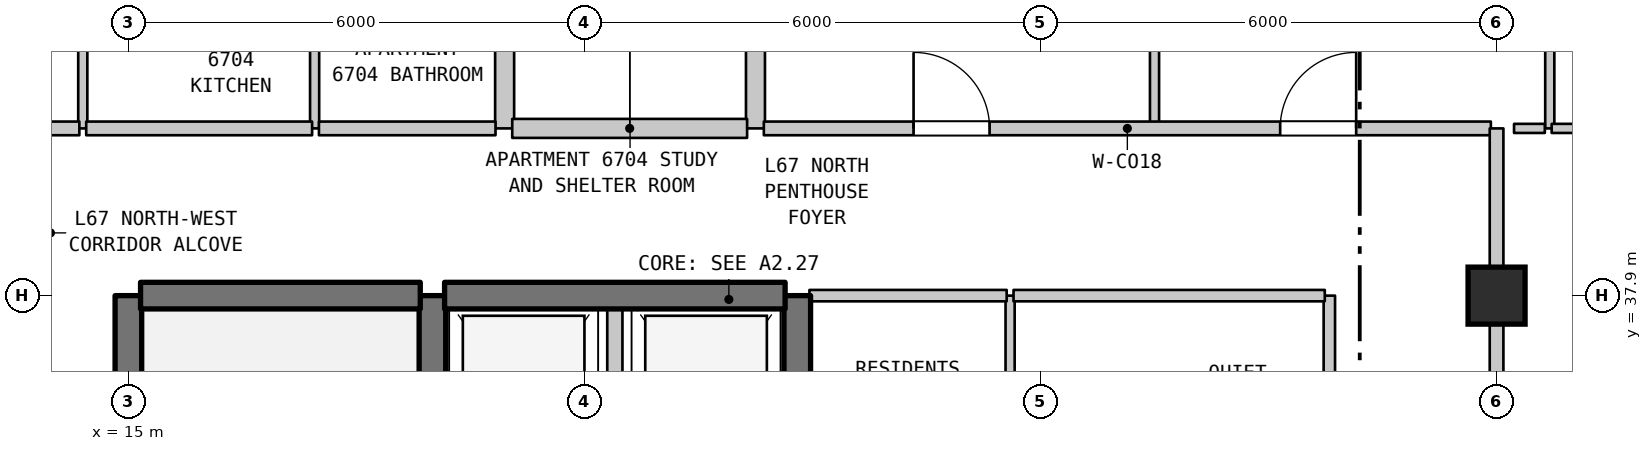
"""IFC4 building model, lengths in metres.
Left out: names, types, materials, properties, quantities, classifications, styles, units other than length and angle.
Written with IfcOpenShell. Run it as: python <this file> out.ifc"""

import sys

from ifc_helpers import new_model, si_unit, direction, frame, frame_2d, origin, origin_2d, place, context, subcontext, project, spatial, rectangle, extrude, element, fill, save


model = new_model("IFC4")
c1 = context("Model", 3, precision=1e-05, world=origin(), true_north=direction((0.0, 1.0)))
c2 = subcontext(c1, "Body", "Model", "MODEL_VIEW")
j1 = project(units=[si_unit("LENGTHUNIT", "METRE"), si_unit("PLANEANGLEUNIT", "RADIAN")], contexts=[c1])
p1 = place(None, origin())
s1 = spatial("IfcSite", under=j1, at=p1, CompositionType="ELEMENT")
p2 = place(p1, origin())
s2 = spatial("IfcBuilding", under=s1, at=p2, CompositionType="ELEMENT")
p3 = place(p2, frame((0.0, 0.0, 269.5)))
s3 = spatial("IfcBuildingStorey", under=s2, at=p3, CompositionType="ELEMENT", Elevation=269.5)
p4 = place(p3, frame((33.0, 37.9, 0.0), z_axis=(0.0, 0.0, 1.0), x_axis=(1.0, 0.0, 0.0)))
e1 = element("IfcColumn", 1, at=p4, inside=s3, PredefinedType="COLUMN", context=c2, shape_type="SweptSolid", body=[
    extrude(rectangle(XDim=0.75, YDim=0.75, at=origin_2d()), origin(), (0.0, 0.0, 1.0), 3.7),
])
p5 = place(p3, frame((14.4, 40.1, 0.0), z_axis=(0.0, 0.0, 1.0), x_axis=(0.0, 1.0, 0.0)))
e2 = element("IfcWall", 2, at=p5, inside=s3, PredefinedType="PARTITIONING", context=c2, shape_type="SweptSolid", body=[
    extrude(rectangle(XDim=2.3, YDim=0.12, at=frame_2d((1.15, 0.0))), origin(), (0.0, 0.0, 1.0), 3.39),
])
p6 = place(p3, frame((15.0, 31.1, 0.0), z_axis=(0.0, 0.0, 1.0), x_axis=(0.0, 1.0, 0.0)))
e3 = element("IfcWall", 3, at=p6, inside=s3, PredefinedType="SHEAR", context=c2, shape_type="SweptSolid", body=[
    extrude(rectangle(XDim=6.8, YDim=0.35, at=frame_2d((3.4, 0.0))), origin(), (0.0, 0.0, 1.0), 3.39),
])
p7 = place(p3, frame((17.45, 40.1, 0.0), z_axis=(0.0, 0.0, 1.0), x_axis=(0.0, 1.0, 0.0)))
e4 = element("IfcWall", 4, at=p7, inside=s3, PredefinedType="PARTITIONING", context=c2, shape_type="SweptSolid", body=[
    extrude(rectangle(XDim=2.3, YDim=0.12, at=frame_2d((1.15, 0.0))), origin(), (0.0, 0.0, 1.0), 3.39),
])
p8 = place(p3, frame((19.0, 35.0, 0.0), z_axis=(0.0, 0.0, 1.0), x_axis=(0.0, 1.0, 0.0)))
e5 = element("IfcWall", 5, at=p8, inside=s3, PredefinedType="SHEAR", context=c2, shape_type="SweptSolid", body=[
    extrude(rectangle(XDim=2.9, YDim=0.35, at=frame_2d((1.45, 0.0))), origin(), (0.0, 0.0, 1.0), 3.39),
])
p9 = place(p3, frame((19.95, 40.1, 0.0), z_axis=(0.0, 0.0, 1.0), x_axis=(0.0, 1.0, 0.0)))
e6 = element("IfcWall", 6, at=p9, inside=s3, PredefinedType="STANDARD", context=c2, shape_type="SweptSolid", body=[
    extrude(rectangle(XDim=2.3, YDim=0.25, at=frame_2d((1.15, 0.0))), origin(), (0.0, 0.0, 1.0), 3.39),
])
p10 = place(p3, frame((21.4, 35.0, 0.0), z_axis=(0.0, 0.0, 1.0), x_axis=(0.0, 1.0, 0.0)))
e7 = element("IfcWall", 7, at=p10, inside=s3, PredefinedType="STANDARD", context=c2, shape_type="SweptSolid", body=[
    extrude(rectangle(XDim=2.9, YDim=0.2, at=frame_2d((1.45, 0.0))), origin(), (0.0, 0.0, 1.0), 3.39),
])
p11 = place(p3, frame((23.25, 40.1, 0.0), z_axis=(0.0, 0.0, 1.0), x_axis=(0.0, 1.0, 0.0)))
e8 = element("IfcWall", 8, at=p11, inside=s3, PredefinedType="STANDARD", context=c2, shape_type="SweptSolid", body=[
    extrude(rectangle(XDim=2.3, YDim=0.25, at=frame_2d((1.15, 0.0))), origin(), (0.0, 0.0, 1.0), 3.39),
])
p12 = place(p3, frame((23.8, 35.0, 0.0), z_axis=(0.0, 0.0, 1.0), x_axis=(0.0, 1.0, 0.0)))
e9 = element("IfcWall", 9, at=p12, inside=s3, PredefinedType="SHEAR", context=c2, shape_type="SweptSolid", body=[
    extrude(rectangle(XDim=2.9, YDim=0.35, at=frame_2d((1.45, 0.0))), origin(), (0.0, 0.0, 1.0), 3.39),
])
p13 = place(p3, frame((26.6, 35.0, 0.0), z_axis=(0.0, 0.0, 1.0), x_axis=(0.0, 1.0, 0.0)))
e10 = element("IfcWall", 10, at=p13, inside=s3, PredefinedType="PARTITIONING", context=c2, shape_type="SweptSolid", body=[
    extrude(rectangle(XDim=2.9, YDim=0.12, at=frame_2d((1.45, 0.0))), origin(), (0.0, 0.0, 1.0), 3.39),
])
p14 = place(p3, frame((28.5, 40.1, 0.0), z_axis=(0.0, 0.0, 1.0), x_axis=(0.0, 1.0, 0.0)))
e11 = element("IfcWall", 11, at=p14, inside=s3, PredefinedType="PARTITIONING", context=c2, shape_type="SweptSolid", body=[
    extrude(rectangle(XDim=2.05, YDim=0.12, at=frame_2d((1.025, 0.0))), origin(), (0.0, 0.0, 1.0), 3.39),
])
p15 = place(p3, frame((30.8, 35.0, 0.0), z_axis=(0.0, 0.0, 1.0), x_axis=(0.0, 1.0, 0.0)))
e12 = element("IfcWall", 12, at=p15, inside=s3, PredefinedType="STANDARD", context=c2, shape_type="SweptSolid", body=[
    extrude(rectangle(XDim=2.9, YDim=0.15, at=frame_2d((1.45, 0.0))), origin(), (0.0, 0.0, 1.0), 3.39),
])
p16 = place(p3, frame((33.0, 33.75, 0.0), z_axis=(0.0, 0.0, 1.0), x_axis=(0.0, 1.0, 0.0)))
e13 = element("IfcWall", 13, at=p16, inside=s3, PredefinedType="STANDARD", context=c2, shape_type="SweptSolid", body=[
    extrude(rectangle(XDim=4.15, YDim=0.18, at=frame_2d((2.075, 0.0))), origin(), (0.0, 0.0, 1.0), 2.89),
])
p17 = place(p3, frame((33.7, 40.1, 0.0), z_axis=(0.0, 0.0, 1.0), x_axis=(0.0, 1.0, 0.0)))
e14 = element("IfcWall", 14, at=p17, inside=s3, PredefinedType="PARTITIONING", context=c2, shape_type="SweptSolid", body=[
    extrude(rectangle(XDim=2.3, YDim=0.12, at=frame_2d((1.15, 0.0))), origin(), (0.0, 0.0, 1.0), 3.39),
])
p18 = place(p3, frame((15.16, 37.9, 0.0), z_axis=(0.0, 0.0, 1.0), x_axis=(1.0, 0.0, 0.0)))
e15 = element("IfcWall", 15, at=p18, inside=s3, PredefinedType="SHEAR", context=c2, shape_type="SweptSolid", body=[
    extrude(rectangle(XDim=3.68, YDim=0.35, at=frame_2d((1.84, 0.0))), origin(), (0.0, 0.0, 1.0), 3.39),
])
p19 = place(p3, frame((19.16, 37.9, 0.0), z_axis=(0.0, 0.0, 1.0), x_axis=(1.0, 0.0, 0.0)))
e16 = element("IfcWall", 16, at=p19, inside=s3, PredefinedType="SHEAR", context=c2, shape_type="SweptSolid", body=[
    extrude(rectangle(XDim=4.48, YDim=0.35, at=frame_2d((2.24, 0.0))), origin(), (0.0, 0.0, 1.0), 3.39),
])
p20 = place(p3, frame((23.96, 37.9, 0.0), z_axis=(0.0, 0.0, 1.0), x_axis=(1.0, 0.0, 0.0)))
e17 = element("IfcWall", 17, at=p20, inside=s3, PredefinedType="STANDARD", context=c2, shape_type="SweptSolid", body=[
    extrude(rectangle(XDim=2.595, YDim=0.15, at=frame_2d((1.297, 0.0))), origin(), (0.0, 0.0, 1.0), 2.89),
])
p21 = place(p3, frame((26.645, 37.9, 0.0), z_axis=(0.0, 0.0, 1.0), x_axis=(1.0, 0.0, 0.0)))
e18 = element("IfcWall", 18, at=p21, inside=s3, PredefinedType="STANDARD", context=c2, shape_type="SweptSolid", body=[
    extrude(rectangle(XDim=4.095, YDim=0.15, at=frame_2d((2.047, 0.0))), origin(), (0.0, 0.0, 1.0), 2.89),
])
p22 = place(p3, frame((12.975, 40.1, 0.0), z_axis=(0.0, 0.0, 1.0), x_axis=(1.0, 0.0, 0.0)))
e19 = element("IfcWall", 19, at=p22, inside=s3, PredefinedType="STANDARD", context=c2, shape_type="SweptSolid", body=[
    extrude(rectangle(XDim=1.38, YDim=0.18, at=frame_2d((0.69, 0.0))), origin(), (0.0, 0.0, 1.0), 3.39),
])
p23 = place(p3, frame((14.445, 40.1, 0.0), z_axis=(0.0, 0.0, 1.0), x_axis=(1.0, 0.0, 0.0)))
e20 = element("IfcWall", 20, at=p23, inside=s3, PredefinedType="STANDARD", context=c2, shape_type="SweptSolid", body=[
    extrude(rectangle(XDim=2.972, YDim=0.18, at=frame_2d((1.486, 0.0))), origin(), (0.0, 0.0, 1.0), 3.39),
])
p24 = place(p3, frame((17.507, 40.1, 0.0), z_axis=(0.0, 0.0, 1.0), x_axis=(1.0, 0.0, 0.0)))
e21 = element("IfcWall", 21, at=p24, inside=s3, PredefinedType="STANDARD", context=c2, shape_type="SweptSolid", body=[
    extrude(rectangle(XDim=2.323, YDim=0.18, at=frame_2d((1.162, 0.0))), origin(), (0.0, 0.0, 1.0), 3.39),
])
p25 = place(p3, frame((20.05, 40.1, 0.0), z_axis=(0.0, 0.0, 1.0), x_axis=(1.0, 0.0, 0.0)))
e22 = element("IfcWall", 22, at=p25, inside=s3, PredefinedType="STANDARD", context=c2, shape_type="SweptSolid", body=[
    extrude(rectangle(XDim=3.09, YDim=0.25, at=frame_2d((1.545, 0.0))), origin(), (0.0, 0.0, 1.0), 3.39),
])
p26 = place(p3, frame((23.36, 40.1, 0.0), z_axis=(0.0, 0.0, 1.0), x_axis=(1.0, 0.0, 0.0)))
e23 = element("IfcWall", 23, at=p26, inside=s3, PredefinedType="STANDARD", context=c2, shape_type="SweptSolid", body=[
    extrude(rectangle(XDim=9.565, YDim=0.18, at=frame_2d((4.782, 0.0))), origin(), (0.0, 0.0, 1.0), 3.39),
])
p27 = place(p26, frame((1.97, 0.0, 0.0)))
e24 = element("IfcOpeningElement", 24, at=p27, cuts=e23, PredefinedType="OPENING", context=c2, shape_type="SweptSolid", body=[
    extrude(rectangle(XDim=1.0, YDim=2.15, at=frame_2d((0.5, 1.075))), frame((0.0, 0.1, 0.0), z_axis=(0.0, -1.0, 0.0), x_axis=(1.0, 0.0, 0.0)), (0.0, 0.0, 1.0), 0.2),
])
p28 = place(p26, frame((6.793, 0.0, 0.0)))
e25 = element("IfcOpeningElement", 25, at=p28, cuts=e23, PredefinedType="OPENING", context=c2, shape_type="SweptSolid", body=[
    extrude(rectangle(XDim=1.0, YDim=2.15, at=frame_2d((0.5, 1.075))), frame((0.0, 0.1, 0.0), z_axis=(0.0, -1.0, 0.0), x_axis=(1.0, 0.0, 0.0)), (0.0, 0.0, 1.0), 0.2),
])
p29 = place(p3, frame((33.23, 40.1, 0.0), z_axis=(0.0, 0.0, 1.0), x_axis=(1.0, 0.0, 0.0)))
e26 = element("IfcWall", 26, at=p29, inside=s3, PredefinedType="PARTITIONING", context=c2, shape_type="SweptSolid", body=[
    extrude(rectangle(XDim=0.405, YDim=0.12, at=frame_2d((0.203, 0.0))), origin(), (0.0, 0.0, 1.0), 3.39),
])
p30 = place(p3, frame((33.725, 40.1, 0.0), z_axis=(0.0, 0.0, 1.0), x_axis=(1.0, 0.0, 0.0)))
e27 = element("IfcWall", 27, at=p30, inside=s3, PredefinedType="PARTITIONING", context=c2, shape_type="SweptSolid", body=[
    extrude(rectangle(XDim=1.685, YDim=0.12, at=frame_2d((0.842, 0.0))), origin(), (0.0, 0.0, 1.0), 3.39),
])
p31 = place(p3, frame((33.0, 37.9, 0.0), z_axis=(0.0, 0.0, 1.0), x_axis=(0.0, 1.0, 0.0)))
e28 = element("IfcWall", 28, at=p31, inside=s3, PredefinedType="STANDARD", context=c2, shape_type="SweptSolid", body=[
    extrude(rectangle(XDim=2.2, YDim=0.18, at=frame_2d((1.1, 0.0))), origin(), (0.0, 0.0, 1.0), 2.79),
])
p32 = place(p27, origin())
e29 = element("IfcDoor", 29, at=p32, inside=s3, OperationType="SINGLE_SWING_LEFT", PredefinedType="DOOR", context=c2, shape_type="SweptSolid", body=[
    extrude(rectangle(XDim=1.0, YDim=2.15, at=frame_2d((0.5, 1.075))), frame((0.0, 0.025, 0.0), z_axis=(0.0, -1.0, 0.0), x_axis=(1.0, 0.0, 0.0)), (0.0, 0.0, 1.0), 0.05),
])
fill(e24, e29)
p33 = place(p28, origin())
e30 = element("IfcDoor", 30, at=p33, inside=s3, OperationType="SINGLE_SWING_RIGHT", PredefinedType="DOOR", context=c2, shape_type="SweptSolid", body=[
    extrude(rectangle(XDim=1.0, YDim=2.15, at=frame_2d((0.5, 1.075))), frame((0.0, 0.025, 0.0), z_axis=(0.0, -1.0, 0.0), x_axis=(1.0, 0.0, 0.0)), (0.0, 0.0, 1.0), 0.05),
])
fill(e25, e30)
save(model, sys.argv[1])
